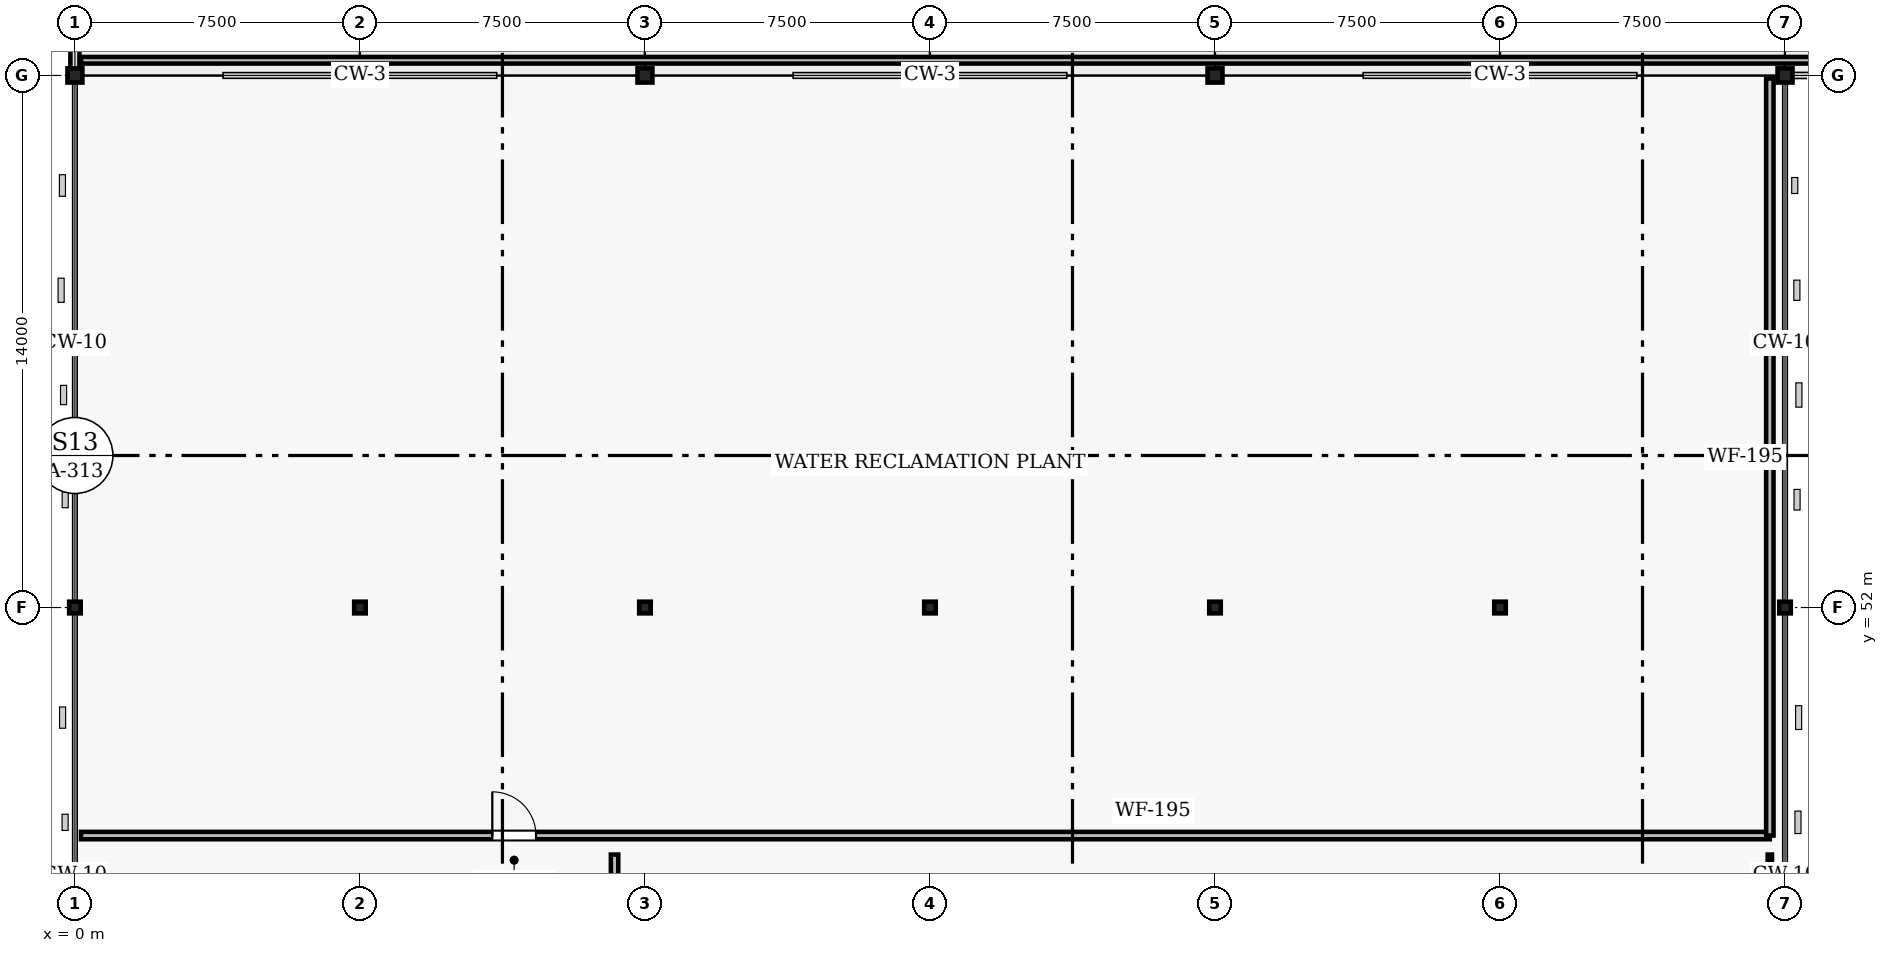
"""IFC4 building model, lengths in metres.
Left out: names, types, materials, properties, quantities, classifications, styles, units other than length and angle.
Written with IfcOpenShell. Run it as: python <this file> out.ifc"""

import sys

from ifc_helpers import new_model, si_unit, direction, frame, frame_2d, origin, origin_2d, place, context, subcontext, project, spatial, rectangle, i_section, extrude, element, fill, save


model = new_model("IFC4")
c1 = context("Model", 3, precision=1e-05, world=origin(), true_north=direction((0.0, 1.0)))
c2 = subcontext(c1, "Body", "Model", "MODEL_VIEW")
j1 = project(units=[si_unit("LENGTHUNIT", "METRE"), si_unit("PLANEANGLEUNIT", "RADIAN")], contexts=[c1])
p1 = place(None, origin())
s1 = spatial("IfcSite", under=j1, at=p1, CompositionType="ELEMENT")
p2 = place(p1, origin())
s2 = spatial("IfcBuilding", under=s1, at=p2, CompositionType="ELEMENT")
p3 = place(p2, frame((0.0, 0.0, 4.5)))
s3 = spatial("IfcBuildingStorey", under=s2, at=p3, CompositionType="ELEMENT", Elevation=4.5)
p4 = place(p3, frame((0.0, 52.0, 0.0), z_axis=(0.0, 0.0, 1.0), x_axis=(1.0, 0.0, 0.0)))
e1 = element("IfcColumn", 1, at=p4, inside=s3, PredefinedType="COLUMN", context=c2, shape_type="SweptSolid", body=[
    extrude(i_section(OverallWidth=0.305, OverallDepth=0.308, WebThickness=0.01, FlangeThickness=0.015, FilletRadius=0.015, at=origin_2d()), origin(), (0.0, 0.0, 1.0), 4.5),
])
p5 = place(p3, frame((0.0, 66.0, 0.0), z_axis=(0.0, 0.0, 1.0), x_axis=(1.0, 0.0, 0.0)))
e2 = element("IfcColumn", 2, at=p5, inside=s3, PredefinedType="COLUMN", context=c2, shape_type="SweptSolid", body=[
    extrude(i_section(OverallWidth=0.394, OverallDepth=0.375, WebThickness=0.021, FlangeThickness=0.033, FilletRadius=0.018, at=origin_2d()), origin(), (0.0, 0.0, 1.0), 4.5),
])
p6 = place(p3, frame((7.5, 52.0, 0.0), z_axis=(0.0, 0.0, 1.0), x_axis=(1.0, 0.0, 0.0)))
e3 = element("IfcColumn", 3, at=p6, inside=s3, PredefinedType="COLUMN", context=c2, shape_type="SweptSolid", body=[
    extrude(i_section(OverallWidth=0.305, OverallDepth=0.308, WebThickness=0.01, FlangeThickness=0.015, FilletRadius=0.015, at=origin_2d()), origin(), (0.0, 0.0, 1.0), 4.5),
])
p7 = place(p3, frame((7.5, 66.0, 0.0), z_axis=(0.0, 0.0, 1.0), x_axis=(1.0, 0.0, 0.0)))
e4 = element("IfcColumn", 4, at=p7, inside=s3, PredefinedType="COLUMN", context=c2, shape_type="SweptSolid", body=[
    extrude(i_section(OverallWidth=0.394, OverallDepth=0.375, WebThickness=0.021, FlangeThickness=0.033, FilletRadius=0.018, at=origin_2d()), origin(), (0.0, 0.0, 1.0), 4.5),
])
p8 = place(p3, frame((15.0, 52.0, 0.0), z_axis=(0.0, 0.0, 1.0), x_axis=(1.0, 0.0, 0.0)))
e5 = element("IfcColumn", 5, at=p8, inside=s3, PredefinedType="COLUMN", context=c2, shape_type="SweptSolid", body=[
    extrude(i_section(OverallWidth=0.305, OverallDepth=0.308, WebThickness=0.01, FlangeThickness=0.015, FilletRadius=0.015, at=origin_2d()), origin(), (0.0, 0.0, 1.0), 4.5),
])
p9 = place(p3, frame((15.0, 66.0, 0.0), z_axis=(0.0, 0.0, 1.0), x_axis=(1.0, 0.0, 0.0)))
e6 = element("IfcColumn", 6, at=p9, inside=s3, PredefinedType="COLUMN", context=c2, shape_type="SweptSolid", body=[
    extrude(i_section(OverallWidth=0.394, OverallDepth=0.375, WebThickness=0.021, FlangeThickness=0.033, FilletRadius=0.018, at=origin_2d()), origin(), (0.0, 0.0, 1.0), 4.5),
])
p10 = place(p3, frame((22.5, 52.0, 0.0), z_axis=(0.0, 0.0, 1.0), x_axis=(1.0, 0.0, 0.0)))
e7 = element("IfcColumn", 7, at=p10, inside=s3, PredefinedType="COLUMN", context=c2, shape_type="SweptSolid", body=[
    extrude(i_section(OverallWidth=0.305, OverallDepth=0.308, WebThickness=0.01, FlangeThickness=0.015, FilletRadius=0.015, at=origin_2d()), origin(), (0.0, 0.0, 1.0), 4.5),
])
p11 = place(p3, frame((22.5, 66.0, 0.0), z_axis=(0.0, 0.0, 1.0), x_axis=(1.0, 0.0, 0.0)))
e8 = element("IfcColumn", 8, at=p11, inside=s3, PredefinedType="COLUMN", context=c2, shape_type="SweptSolid", body=[
    extrude(i_section(OverallWidth=0.394, OverallDepth=0.375, WebThickness=0.021, FlangeThickness=0.033, FilletRadius=0.018, at=origin_2d()), origin(), (0.0, 0.0, 1.0), 4.5),
])
p12 = place(p3, frame((30.0, 52.0, 0.0), z_axis=(0.0, 0.0, 1.0), x_axis=(1.0, 0.0, 0.0)))
e9 = element("IfcColumn", 9, at=p12, inside=s3, PredefinedType="COLUMN", context=c2, shape_type="SweptSolid", body=[
    extrude(i_section(OverallWidth=0.305, OverallDepth=0.308, WebThickness=0.01, FlangeThickness=0.015, FilletRadius=0.015, at=origin_2d()), origin(), (0.0, 0.0, 1.0), 4.5),
])
p13 = place(p3, frame((30.0, 66.0, 0.0), z_axis=(0.0, 0.0, 1.0), x_axis=(1.0, 0.0, 0.0)))
e10 = element("IfcColumn", 10, at=p13, inside=s3, PredefinedType="COLUMN", context=c2, shape_type="SweptSolid", body=[
    extrude(i_section(OverallWidth=0.394, OverallDepth=0.375, WebThickness=0.021, FlangeThickness=0.033, FilletRadius=0.018, at=origin_2d()), origin(), (0.0, 0.0, 1.0), 4.5),
])
p14 = place(p3, frame((37.5, 52.0, 0.0), z_axis=(0.0, 0.0, 1.0), x_axis=(1.0, 0.0, 0.0)))
e11 = element("IfcColumn", 11, at=p14, inside=s3, PredefinedType="COLUMN", context=c2, shape_type="SweptSolid", body=[
    extrude(i_section(OverallWidth=0.305, OverallDepth=0.308, WebThickness=0.01, FlangeThickness=0.015, FilletRadius=0.015, at=origin_2d()), origin(), (0.0, 0.0, 1.0), 4.5),
])
p15 = place(p3, frame((37.5, 66.0, 0.0), z_axis=(0.0, 0.0, 1.0), x_axis=(1.0, 0.0, 0.0)))
e12 = element("IfcColumn", 12, at=p15, inside=s3, PredefinedType="COLUMN", context=c2, shape_type="SweptSolid", body=[
    extrude(i_section(OverallWidth=0.394, OverallDepth=0.375, WebThickness=0.021, FlangeThickness=0.033, FilletRadius=0.018, at=origin_2d()), origin(), (0.0, 0.0, 1.0), 4.5),
])
p16 = place(p3, frame((45.0, 52.0, 0.0), z_axis=(0.0, 0.0, 1.0), x_axis=(1.0, 0.0, 0.0)))
e13 = element("IfcColumn", 13, at=p16, inside=s3, PredefinedType="COLUMN", context=c2, shape_type="SweptSolid", body=[
    extrude(i_section(OverallWidth=0.305, OverallDepth=0.308, WebThickness=0.01, FlangeThickness=0.015, FilletRadius=0.015, at=origin_2d()), origin(), (0.0, 0.0, 1.0), 4.5),
])
p17 = place(p3, frame((45.0, 66.0, 0.0), z_axis=(0.0, 0.0, 1.0), x_axis=(1.0, 0.0, 0.0)))
e14 = element("IfcColumn", 14, at=p17, inside=s3, PredefinedType="COLUMN", context=c2, shape_type="SweptSolid", body=[
    extrude(i_section(OverallWidth=0.394, OverallDepth=0.375, WebThickness=0.021, FlangeThickness=0.033, FilletRadius=0.018, at=origin_2d()), origin(), (0.0, 0.0, 1.0), 4.5),
])
p18 = place(p3, frame((0.0, 66.08, 0.0), z_axis=(0.0, 0.0, 1.0), x_axis=(0.0, 1.0, 0.0)))
e15 = element("IfcWall", 15, at=p18, inside=s3, PredefinedType="SOLIDWALL", context=c2, shape_type="SweptSolid", body=[
    extrude(rectangle(XDim=12.0, YDim=0.24, at=frame_2d((6.0, 0.0))), origin(), (0.0, 0.0, 1.0), 3.1),
])
p19 = place(p3, frame((0.16, 66.4, 0.0), z_axis=(0.0, 0.0, 1.0), x_axis=(1.0, 0.0, 0.0)))
e16 = element("IfcWall", 16, at=p19, inside=s3, PredefinedType="PARTITIONING", context=c2, shape_type="SweptSolid", body=[
    extrude(rectangle(XDim=104.84, YDim=0.175, at=frame_2d((52.42, 0.0))), origin(), (0.0, 0.0, 1.0), 3.7),
])
p20 = place(p19, frame((77.415, 0.0, 0.0)))
e17 = element("IfcOpeningElement", 17, at=p20, cuts=e16, PredefinedType="OPENING", context=c2, shape_type="SweptSolid", body=[
    extrude(rectangle(XDim=1.62, YDim=2.18, at=frame_2d((0.81, 1.09))), frame((0.0, 0.097, 0.0), z_axis=(0.0, -1.0, 0.0), x_axis=(1.0, 0.0, 0.0)), (0.0, 0.0, 1.0), 0.195),
])
p21 = place(p3, frame((0.16, 46.0, 0.0), z_axis=(0.0, 0.0, 1.0), x_axis=(1.0, 0.0, 0.0)))
e18 = element("IfcWall", 18, at=p21, inside=s3, PredefinedType="PARTITIONING", context=c2, shape_type="SweptSolid", body=[
    extrude(rectangle(XDim=44.44, YDim=0.195, at=frame_2d((22.22, 0.0))), origin(), (0.0, 0.0, 1.0), 3.7),
])
p22 = place(p21, frame((10.823, 0.0, 0.0)))
e19 = element("IfcOpeningElement", 19, at=p22, cuts=e18, PredefinedType="OPENING", context=c2, shape_type="SweptSolid", body=[
    extrude(rectangle(XDim=1.15, YDim=2.15, at=frame_2d((0.575, 1.075))), frame((0.0, 0.107, 0.0), z_axis=(0.0, -1.0, 0.0), x_axis=(1.0, 0.0, 0.0)), (0.0, 0.0, 1.0), 0.215),
])
p23 = place(p3, frame((44.6, 46.0, 0.0), z_axis=(0.0, 0.0, 1.0), x_axis=(0.0, 1.0, 0.0)))
e20 = element("IfcWall", 20, at=p23, inside=s3, PredefinedType="PARTITIONING", context=c2, shape_type="SweptSolid", body=[
    extrude(rectangle(XDim=19.92, YDim=0.195, at=frame_2d((9.96, 0.0))), origin(), (0.0, 0.0, 1.0), 3.613),
])
p24 = place(p3, frame((44.6, 35.0, 0.0), z_axis=(0.0, 0.0, 1.0), x_axis=(0.0, 1.0, 0.0)))
e21 = element("IfcWall", 21, at=p24, inside=s3, PredefinedType="PARTITIONING", context=c2, shape_type="SweptSolid", body=[
    extrude(rectangle(XDim=10.5, YDim=0.114, at=frame_2d((5.25, 0.0))), origin(), (0.0, 0.0, 1.0), 3.613),
])
p25 = place(p3, frame((14.2, 35.0, 0.0), z_axis=(0.0, 0.0, 1.0), x_axis=(0.0, 1.0, 0.0)))
e22 = element("IfcWall", 22, at=p25, inside=s3, PredefinedType="PARTITIONING", context=c2, shape_type="SweptSolid", body=[
    extrude(rectangle(XDim=10.5, YDim=0.195, at=frame_2d((5.25, 0.0))), origin(), (0.0, 0.0, 1.0), 3.7),
])
p26 = place(p22, origin())
e23 = element("IfcDoor", 23, at=p26, inside=s3, OperationType="SINGLE_SWING_LEFT", PredefinedType="DOOR", context=c2, shape_type="SweptSolid", body=[
    extrude(rectangle(XDim=1.15, YDim=2.15, at=frame_2d((0.575, 1.075))), frame((0.0, 0.025, 0.0), z_axis=(0.0, -1.0, 0.0), x_axis=(1.0, 0.0, 0.0)), (0.0, 0.0, 1.0), 0.05),
])
fill(e19, e23)
save(model, sys.argv[1])
